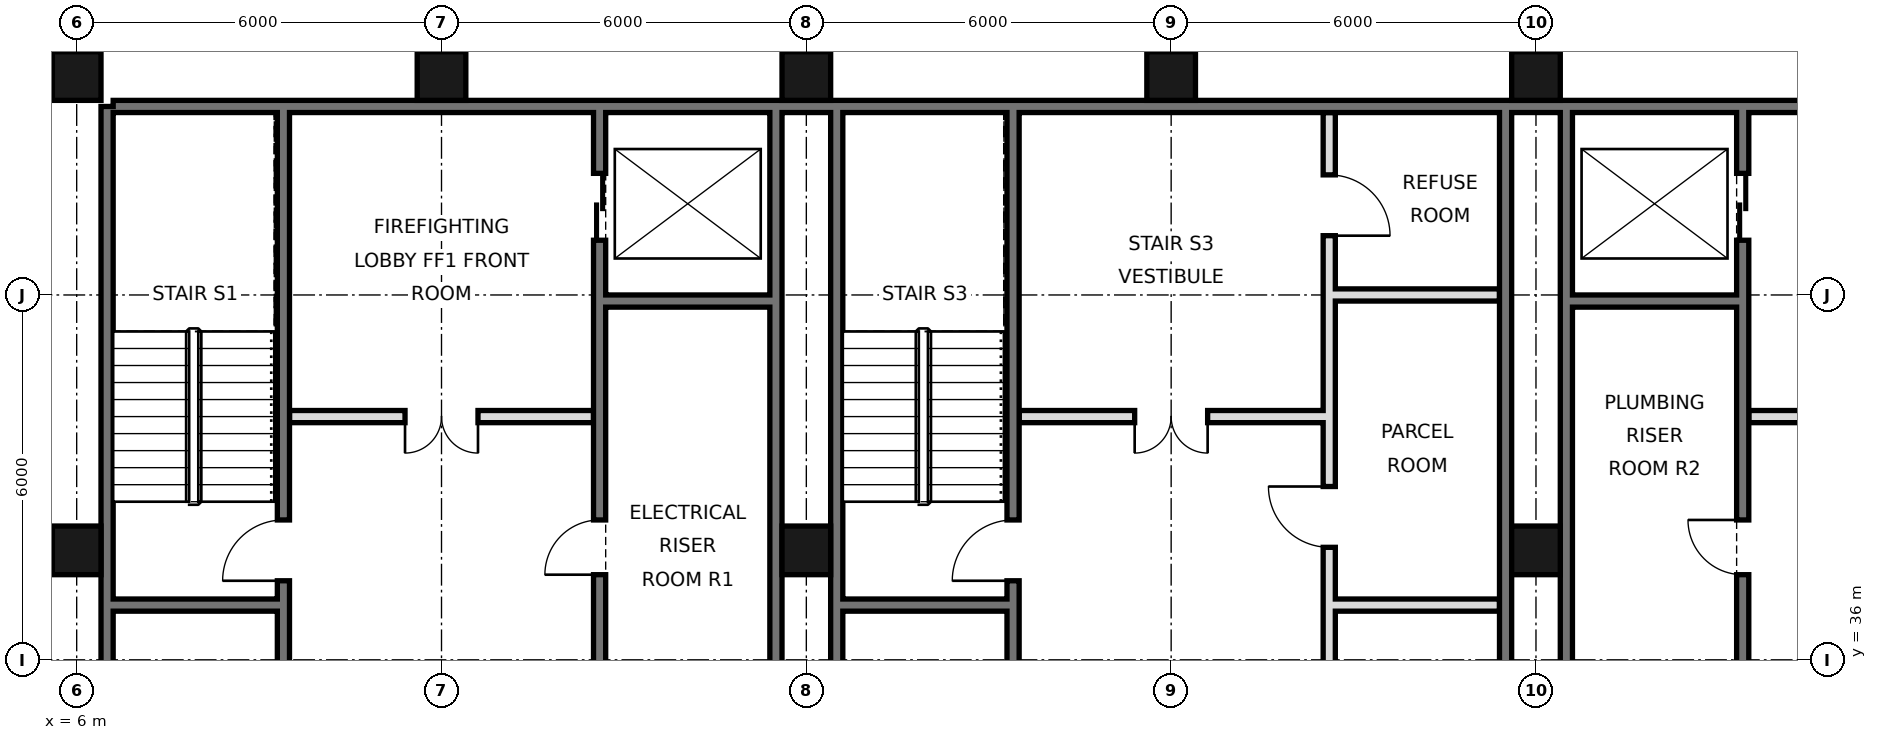
"""IFC4 building model, lengths in metres.
Left out: names, types, materials, properties, quantities, classifications, styles, units other than length and angle.
Written with IfcOpenShell. Run it as: python <this file> out.ifc"""

import sys

from ifc_helpers import new_model, si_unit, direction, frame, frame_2d, origin, origin_2d, place, context, subcontext, project, spatial, rectangle, hollow_rectangle, extrude, element, fill, save


model = new_model("IFC4")
c1 = context("Model", 3, precision=1e-05, world=origin(), true_north=direction((0.0, 1.0)))
c2 = subcontext(c1, "Body", "Model", "MODEL_VIEW")
j1 = project(units=[si_unit("LENGTHUNIT", "METRE"), si_unit("PLANEANGLEUNIT", "RADIAN")], contexts=[c1])
p1 = place(None, origin())
s1 = spatial("IfcSite", under=j1, at=p1, CompositionType="ELEMENT")
p2 = place(p1, origin())
s2 = spatial("IfcBuilding", under=s1, at=p2, CompositionType="ELEMENT")
p3 = place(p2, frame((0.0, 0.0, 239.6)))
s3 = spatial("IfcBuildingStorey", under=s2, at=p3, CompositionType="ELEMENT", Elevation=239.6)
for number, where, z_axis, x_axis in (
    (1, (6.0, 37.8, 0.0), (0.0, 0.0, 1.0), (1.0, 0.0, 0.0)),
    (2, (6.0, 45.6, 0.0), (0.0, 0.0, 1.0), (1.0, 0.0, 0.0)),
    (3, (12.0, 45.6, 0.0), (0.0, 0.0, 1.0), (1.0, 0.0, 0.0)),
    (4, (18.0, 37.8, 0.0), (0.0, 0.0, 1.0), (1.0, 0.0, 0.0)),
    (5, (18.0, 45.6, 0.0), (0.0, 0.0, 1.0), (1.0, 0.0, 0.0)),
    (6, (24.0, 45.6, 0.0), (0.0, 0.0, 1.0), (1.0, 0.0, 0.0)),
    (7, (30.0, 37.8, 0.0), (0.0, 0.0, 1.0), (1.0, 0.0, 0.0)),
    (8, (30.0, 45.6, 0.0), (0.0, 0.0, 1.0), (1.0, 0.0, 0.0)),
):
    element("IfcColumn", number, at=place(p3, frame(where, z_axis=z_axis, x_axis=x_axis)), inside=s3, PredefinedType="COLUMN", context=c2, shape_type="SweptSolid", body=[
        extrude(hollow_rectangle(XDim=0.8, YDim=0.8, WallThickness=0.04, at=origin_2d()), origin(), (0.0, 0.0, 1.0), 3.6),
    ])
p4 = place(p3, frame((6.5, 21.6, 0.0), z_axis=(0.0, 0.0, 1.0), x_axis=(0.0, 1.0, 0.0)))
e9 = element("IfcWall", 9, at=p4, inside=s3, PredefinedType="SOLIDWALL", context=c2, shape_type="SweptSolid", body=[
    extrude(rectangle(XDim=23.5, YDim=0.2, at=frame_2d((11.75, 0.0))), origin(), (0.0, 0.0, 1.0), 3.42),
])
p5 = place(p3, frame((6.6, 45.1, 0.0), z_axis=(0.0, 0.0, 1.0), x_axis=(1.0, 0.0, 0.0)))
e10 = element("IfcWall", 10, at=p5, inside=s3, PredefinedType="SOLIDWALL", context=c2, shape_type="SweptSolid", body=[
    extrude(rectangle(XDim=34.8, YDim=0.2, at=frame_2d((17.4, 0.0))), origin(), (0.0, 0.0, 1.0), 3.42),
])
for number, where, z_axis, x_axis in (
    (11, (17.5, 27.6, 0.0), (0.0, 0.0, 1.0), (0.0, 1.0, 0.0)),
    (12, (18.5, 27.6, 0.0), (0.0, 0.0, 1.0), (0.0, 1.0, 0.0)),
    (13, (29.5, 27.6, 0.0), (0.0, 0.0, 1.0), (0.0, 1.0, 0.0)),
    (14, (30.5, 27.6, 0.0), (0.0, 0.0, 1.0), (0.0, 1.0, 0.0)),
):
    element("IfcWall", number, at=place(p3, frame(where, z_axis=z_axis, x_axis=x_axis)), inside=s3, PredefinedType="SOLIDWALL", context=c2, shape_type="SweptSolid", body=[
        extrude(rectangle(XDim=17.5, YDim=0.2, at=frame_2d((8.75, 0.0))), origin(), (0.0, 0.0, 1.0), 3.42),
    ])
p6 = place(p3, frame((14.6, 27.5, 0.0), z_axis=(0.0, 0.0, 1.0), x_axis=(0.0, 1.0, 0.0)))
e15 = element("IfcWall", 15, at=p6, inside=s3, PredefinedType="SOLIDWALL", context=c2, shape_type="SweptSolid", body=[
    extrude(rectangle(XDim=17.5, YDim=0.2, at=frame_2d((8.75, 0.0))), origin(), (0.0, 0.0, 1.0), 3.42),
])
p7 = place(p6, frame((15.4, 0.0, 0.0)))
e16 = element("IfcOpeningElement", 16, at=p7, cuts=e15, PredefinedType="OPENING", context=c2, shape_type="SweptSolid", body=[
    extrude(rectangle(XDim=1.1, YDim=2.1, at=frame_2d((0.55, 1.05))), frame((0.0, 0.11, 0.0), z_axis=(0.0, -1.0, 0.0), x_axis=(1.0, 0.0, 0.0)), (0.0, 0.0, 1.0), 0.22),
])
p8 = place(p6, frame((2.7, 0.0, 0.0)))
e17 = element("IfcOpeningElement", 17, at=p8, cuts=e15, PredefinedType="OPENING", context=c2, shape_type="SweptSolid", body=[
    extrude(rectangle(XDim=1.0, YDim=2.1, at=frame_2d((0.5, 1.05))), frame((0.0, 0.11, 0.0), z_axis=(0.0, -1.0, 0.0), x_axis=(1.0, 0.0, 0.0)), (0.0, 0.0, 1.0), 0.22),
])
p9 = place(p6, frame((9.9, 0.0, 0.0)))
e18 = element("IfcOpeningElement", 18, at=p9, cuts=e15, PredefinedType="OPENING", context=c2, shape_type="SweptSolid", body=[
    extrude(rectangle(XDim=0.9, YDim=2.1, at=frame_2d((0.45, 1.05))), frame((0.0, 0.11, 0.0), z_axis=(0.0, -1.0, 0.0), x_axis=(1.0, 0.0, 0.0)), (0.0, 0.0, 1.0), 0.22),
])
p10 = place(p3, frame((21.4, 27.5, 0.0), z_axis=(0.0, 0.0, 1.0), x_axis=(0.0, 1.0, 0.0)))
e19 = element("IfcWall", 19, at=p10, inside=s3, PredefinedType="SOLIDWALL", context=c2, shape_type="SweptSolid", body=[
    extrude(rectangle(XDim=17.5, YDim=0.2, at=frame_2d((8.75, 0.0))), origin(), (0.0, 0.0, 1.0), 3.42),
])
p11 = place(p10, frame((0.55, 0.0, 0.0)))
e20 = element("IfcOpeningElement", 20, at=p11, cuts=e19, PredefinedType="OPENING", context=c2, shape_type="SweptSolid", body=[
    extrude(rectangle(XDim=1.0, YDim=2.1, at=frame_2d((0.5, 1.05))), frame((0.0, 0.11, 0.0), z_axis=(0.0, -1.0, 0.0), x_axis=(1.0, 0.0, 0.0)), (0.0, 0.0, 1.0), 0.22),
])
p12 = place(p10, frame((3.65, 0.0, 0.0)))
e21 = element("IfcOpeningElement", 21, at=p12, cuts=e19, PredefinedType="OPENING", context=c2, shape_type="SweptSolid", body=[
    extrude(rectangle(XDim=1.0, YDim=2.1, at=frame_2d((0.5, 1.05))), frame((0.0, 0.11, 0.0), z_axis=(0.0, -1.0, 0.0), x_axis=(1.0, 0.0, 0.0)), (0.0, 0.0, 1.0), 0.22),
])
p13 = place(p10, frame((9.8, 0.0, 0.0)))
e22 = element("IfcOpeningElement", 22, at=p13, cuts=e19, PredefinedType="OPENING", context=c2, shape_type="SweptSolid", body=[
    extrude(rectangle(XDim=1.0, YDim=2.1, at=frame_2d((0.5, 1.05))), frame((0.0, 0.11, 0.0), z_axis=(0.0, -1.0, 0.0), x_axis=(1.0, 0.0, 0.0)), (0.0, 0.0, 1.0), 0.22),
])
p14 = place(p10, frame((7.4, 0.0, 0.0)))
e23 = element("IfcOpeningElement", 23, at=p14, cuts=e19, PredefinedType="OPENING", context=c2, shape_type="SweptSolid", body=[
    extrude(rectangle(XDim=0.9, YDim=2.1, at=frame_2d((0.45, 1.05))), frame((0.0, 0.11, 0.0), z_axis=(0.0, -1.0, 0.0), x_axis=(1.0, 0.0, 0.0)), (0.0, 0.0, 1.0), 0.22),
])
p15 = place(p3, frame((26.6, 27.5, 0.0), z_axis=(0.0, 0.0, 1.0), x_axis=(0.0, 1.0, 0.0)))
e24 = element("IfcWall", 24, at=p15, inside=s3, PredefinedType="SOLIDWALL", context=c2, shape_type="SweptSolid", body=[
    extrude(rectangle(XDim=17.5, YDim=0.2, at=frame_2d((8.75, 0.0))), origin(), (0.0, 0.0, 1.0), 3.42),
])
p16 = place(p15, frame((4.3, 0.0, 0.0)))
e25 = element("IfcOpeningElement", 25, at=p16, cuts=e24, PredefinedType="OPENING", context=c2, shape_type="SweptSolid", body=[
    extrude(rectangle(XDim=0.9, YDim=2.1, at=frame_2d((0.45, 1.05))), frame((0.0, 0.11, 0.0), z_axis=(0.0, -1.0, 0.0), x_axis=(1.0, 0.0, 0.0)), (0.0, 0.0, 1.0), 0.22),
])
p17 = place(p15, frame((10.35, 0.0, 0.0)))
e26 = element("IfcOpeningElement", 26, at=p17, cuts=e24, PredefinedType="OPENING", context=c2, shape_type="SweptSolid", body=[
    extrude(rectangle(XDim=1.0, YDim=2.1, at=frame_2d((0.5, 1.05))), frame((0.0, 0.11, 0.0), z_axis=(0.0, -1.0, 0.0), x_axis=(1.0, 0.0, 0.0)), (0.0, 0.0, 1.0), 0.22),
])
p18 = place(p15, frame((15.475, 0.0, 0.0)))
e27 = element("IfcOpeningElement", 27, at=p18, cuts=e24, PredefinedType="OPENING", context=c2, shape_type="SweptSolid", body=[
    extrude(rectangle(XDim=1.0, YDim=2.1, at=frame_2d((0.5, 1.05))), frame((0.0, 0.11, 0.0), z_axis=(0.0, -1.0, 0.0), x_axis=(1.0, 0.0, 0.0)), (0.0, 0.0, 1.0), 0.22),
])
p19 = place(p3, frame((33.4, 27.5, 0.0), z_axis=(0.0, 0.0, 1.0), x_axis=(0.0, 1.0, 0.0)))
e28 = element("IfcWall", 28, at=p19, inside=s3, PredefinedType="SOLIDWALL", context=c2, shape_type="SweptSolid", body=[
    extrude(rectangle(XDim=17.5, YDim=0.2, at=frame_2d((8.75, 0.0))), origin(), (0.0, 0.0, 1.0), 3.42),
])
p20 = place(p19, frame((1.1, 0.0, 0.0)))
e29 = element("IfcOpeningElement", 29, at=p20, cuts=e28, PredefinedType="OPENING", context=c2, shape_type="SweptSolid", body=[
    extrude(rectangle(XDim=1.1, YDim=2.1, at=frame_2d((0.55, 1.05))), frame((0.0, 0.11, 0.0), z_axis=(0.0, -1.0, 0.0), x_axis=(1.0, 0.0, 0.0)), (0.0, 0.0, 1.0), 0.22),
])
p21 = place(p19, frame((4.2, 0.0, 0.0)))
e30 = element("IfcOpeningElement", 30, at=p21, cuts=e28, PredefinedType="OPENING", context=c2, shape_type="SweptSolid", body=[
    extrude(rectangle(XDim=1.1, YDim=2.1, at=frame_2d((0.55, 1.05))), frame((0.0, 0.11, 0.0), z_axis=(0.0, -1.0, 0.0), x_axis=(1.0, 0.0, 0.0)), (0.0, 0.0, 1.0), 0.22),
])
p22 = place(p19, frame((15.4, 0.0, 0.0)))
e31 = element("IfcOpeningElement", 31, at=p22, cuts=e28, PredefinedType="OPENING", context=c2, shape_type="SweptSolid", body=[
    extrude(rectangle(XDim=1.1, YDim=2.1, at=frame_2d((0.55, 1.05))), frame((0.0, 0.11, 0.0), z_axis=(0.0, -1.0, 0.0), x_axis=(1.0, 0.0, 0.0)), (0.0, 0.0, 1.0), 0.22),
])
p23 = place(p19, frame((9.9, 0.0, 0.0)))
e32 = element("IfcOpeningElement", 32, at=p23, cuts=e28, PredefinedType="OPENING", context=c2, shape_type="SweptSolid", body=[
    extrude(rectangle(XDim=0.9, YDim=2.1, at=frame_2d((0.45, 1.05))), frame((0.0, 0.11, 0.0), z_axis=(0.0, -1.0, 0.0), x_axis=(1.0, 0.0, 0.0)), (0.0, 0.0, 1.0), 0.22),
])
p24 = place(p3, frame((9.4, 21.6, 0.0), z_axis=(0.0, 0.0, 1.0), x_axis=(0.0, 1.0, 0.0)))
e33 = element("IfcWall", 33, at=p24, inside=s3, PredefinedType="SOLIDWALL", context=c2, shape_type="SweptSolid", body=[
    extrude(rectangle(XDim=23.4, YDim=0.2, at=frame_2d((11.7, 0.0))), origin(), (0.0, 0.0, 1.0), 3.42),
])
p25 = place(p24, frame((7.8, 0.0, 0.0)))
e34 = element("IfcOpeningElement", 34, at=p25, cuts=e33, PredefinedType="OPENING", context=c2, shape_type="SweptSolid", body=[
    extrude(rectangle(XDim=1.0, YDim=2.1, at=frame_2d((0.5, 1.05))), frame((0.0, 0.11, 0.0), z_axis=(0.0, -1.0, 0.0), x_axis=(1.0, 0.0, 0.0)), (0.0, 0.0, 1.0), 0.22),
])
p26 = place(p24, frame((12.45, 0.0, 0.0)))
e35 = element("IfcOpeningElement", 35, at=p26, cuts=e33, PredefinedType="OPENING", context=c2, shape_type="SweptSolid", body=[
    extrude(rectangle(XDim=1.0, YDim=2.1, at=frame_2d((0.5, 1.05))), frame((0.0, 0.11, 0.0), z_axis=(0.0, -1.0, 0.0), x_axis=(1.0, 0.0, 0.0)), (0.0, 0.0, 1.0), 0.22),
])
p27 = place(p24, frame((15.7, 0.0, 0.0)))
e36 = element("IfcOpeningElement", 36, at=p27, cuts=e33, PredefinedType="OPENING", context=c2, shape_type="SweptSolid", body=[
    extrude(rectangle(XDim=1.0, YDim=2.1, at=frame_2d((0.5, 1.05))), frame((0.0, 0.11, 0.0), z_axis=(0.0, -1.0, 0.0), x_axis=(1.0, 0.0, 0.0)), (0.0, 0.0, 1.0), 0.22),
])
p28 = place(p24, frame((0.175, 0.0, 0.0)))
e37 = element("IfcOpeningElement", 37, at=p28, cuts=e33, PredefinedType="OPENING", context=c2, shape_type="SweptSolid", body=[
    extrude(rectangle(XDim=0.9, YDim=2.1, at=frame_2d((0.45, 1.05))), frame((0.0, 0.11, 0.0), z_axis=(0.0, -1.0, 0.0), x_axis=(1.0, 0.0, 0.0)), (0.0, 0.0, 1.0), 0.22),
])
for number, where, z_axis, x_axis in (
    (38, (18.6, 36.9, 0.0), (0.0, 0.0, 1.0), (1.0, 0.0, 0.0)),
    (39, (26.7, 36.9, 0.0), (0.0, 0.0, 1.0), (1.0, 0.0, 0.0)),
    (40, (6.6, 36.9, 0.0), (0.0, 0.0, 1.0), (1.0, 0.0, 0.0)),
):
    element("IfcWall", number, at=place(p3, frame(where, z_axis=z_axis, x_axis=x_axis)), inside=s3, PredefinedType="SOLIDWALL", context=c2, shape_type="SweptSolid", body=[
        extrude(rectangle(XDim=2.7, YDim=0.2, at=frame_2d((1.35, 0.0))), origin(), (0.0, 0.0, 1.0), 3.42),
    ])
p29 = place(p3, frame((21.5, 40.0, 0.0), z_axis=(0.0, 0.0, 1.0), x_axis=(1.0, 0.0, 0.0)))
e41 = element("IfcWall", 41, at=p29, inside=s3, PredefinedType="PARTITIONING", context=c2, shape_type="SweptSolid", body=[
    extrude(rectangle(XDim=5.0, YDim=0.2, at=frame_2d((2.5, 0.0))), origin(), (0.0, 0.0, 1.0), 3.42),
])
p30 = place(p29, frame((1.9, 0.0, 0.0)))
e42 = element("IfcOpeningElement", 42, at=p30, cuts=e41, PredefinedType="OPENING", context=c2, shape_type="SweptSolid", body=[
    extrude(rectangle(XDim=1.2, YDim=2.1, at=frame_2d((0.6, 1.05))), frame((0.0, 0.11, 0.0), z_axis=(0.0, -1.0, 0.0), x_axis=(1.0, 0.0, 0.0)), (0.0, 0.0, 1.0), 0.22),
])
p31 = place(p3, frame((33.5, 40.0, 0.0), z_axis=(0.0, 0.0, 1.0), x_axis=(1.0, 0.0, 0.0)))
e43 = element("IfcWall", 43, at=p31, inside=s3, PredefinedType="PARTITIONING", context=c2, shape_type="SweptSolid", body=[
    extrude(rectangle(XDim=5.0, YDim=0.2, at=frame_2d((2.5, 0.0))), origin(), (0.0, 0.0, 1.0), 3.42),
])
p32 = place(p31, frame((1.9, 0.0, 0.0)))
e44 = element("IfcOpeningElement", 44, at=p32, cuts=e43, PredefinedType="OPENING", context=c2, shape_type="SweptSolid", body=[
    extrude(rectangle(XDim=1.2, YDim=2.1, at=frame_2d((0.6, 1.05))), frame((0.0, 0.11, 0.0), z_axis=(0.0, -1.0, 0.0), x_axis=(1.0, 0.0, 0.0)), (0.0, 0.0, 1.0), 0.22),
])
p33 = place(p3, frame((9.5, 40.0, 0.0), z_axis=(0.0, 0.0, 1.0), x_axis=(1.0, 0.0, 0.0)))
e45 = element("IfcWall", 45, at=p33, inside=s3, PredefinedType="PARTITIONING", context=c2, shape_type="SweptSolid", body=[
    extrude(rectangle(XDim=5.0, YDim=0.2, at=frame_2d((2.5, 0.0))), origin(), (0.0, 0.0, 1.0), 3.42),
])
p34 = place(p33, frame((1.9, 0.0, 0.0)))
e46 = element("IfcOpeningElement", 46, at=p34, cuts=e45, PredefinedType="OPENING", context=c2, shape_type="SweptSolid", body=[
    extrude(rectangle(XDim=1.2, YDim=2.1, at=frame_2d((0.6, 1.05))), frame((0.0, 0.11, 0.0), z_axis=(0.0, -1.0, 0.0), x_axis=(1.0, 0.0, 0.0)), (0.0, 0.0, 1.0), 0.22),
])
for number, where, z_axis, x_axis in (
    (47, (14.7, 41.9, 0.0), (0.0, 0.0, 1.0), (1.0, 0.0, 0.0)),
    (48, (30.6, 41.9, 0.0), (0.0, 0.0, 1.0), (1.0, 0.0, 0.0)),
):
    element("IfcWall", number, at=place(p3, frame(where, z_axis=z_axis, x_axis=x_axis)), inside=s3, PredefinedType="SOLIDWALL", context=c2, shape_type="SweptSolid", body=[
        extrude(rectangle(XDim=2.7, YDim=0.2, at=frame_2d((1.35, 0.0))), origin(), (0.0, 0.0, 1.0), 3.42),
    ])
p35 = place(p3, frame((26.7, 42.0, 0.0), z_axis=(0.0, 0.0, 1.0), x_axis=(1.0, 0.0, 0.0)))
e49 = element("IfcWall", 49, at=p35, inside=s3, PredefinedType="PARTITIONING", context=c2, shape_type="SweptSolid", body=[
    extrude(rectangle(XDim=2.7, YDim=0.2, at=frame_2d((1.35, 0.0))), origin(), (0.0, 0.0, 1.0), 3.42),
])
p36 = place(p34, frame((1.2, 0.0, 0.0), z_axis=(0.0, 0.0, 1.0), x_axis=(-1.0, 0.0, 0.0)))
e50 = element("IfcDoor", 50, at=p36, inside=s3, OperationType="DOUBLE_DOOR_SINGLE_SWING", PredefinedType="DOOR", context=c2, shape_type="SweptSolid", body=[
    extrude(rectangle(XDim=1.2, YDim=2.1, at=frame_2d((0.6, 1.05))), frame((0.0, 0.025, 0.0), z_axis=(0.0, -1.0, 0.0), x_axis=(1.0, 0.0, 0.0)), (0.0, 0.0, 1.0), 0.05),
])
fill(e46, e50)
p37 = place(p30, frame((1.2, 0.0, 0.0), z_axis=(0.0, 0.0, 1.0), x_axis=(-1.0, 0.0, 0.0)))
e51 = element("IfcDoor", 51, at=p37, inside=s3, OperationType="DOUBLE_DOOR_SINGLE_SWING", PredefinedType="DOOR", context=c2, shape_type="SweptSolid", body=[
    extrude(rectangle(XDim=1.2, YDim=2.1, at=frame_2d((0.6, 1.05))), frame((0.0, 0.025, 0.0), z_axis=(0.0, -1.0, 0.0), x_axis=(1.0, 0.0, 0.0)), (0.0, 0.0, 1.0), 0.05),
])
fill(e42, e51)
p38 = place(p22, origin())
e52 = element("IfcDoor", 52, at=p38, inside=s3, OperationType="DOUBLE_DOOR_SLIDING", PredefinedType="DOOR", context=c2, shape_type="SweptSolid", body=[
    extrude(rectangle(XDim=1.1, YDim=2.1, at=frame_2d((0.55, 1.05))), frame((0.0, 0.025, 0.0), z_axis=(0.0, -1.0, 0.0), x_axis=(1.0, 0.0, 0.0)), (0.0, 0.0, 1.0), 0.05),
])
fill(e31, e52)
p39 = place(p7, origin())
e53 = element("IfcDoor", 53, at=p39, inside=s3, OperationType="DOUBLE_DOOR_SLIDING", PredefinedType="DOOR", context=c2, shape_type="SweptSolid", body=[
    extrude(rectangle(XDim=1.1, YDim=2.1, at=frame_2d((0.55, 1.05))), frame((0.0, 0.025, 0.0), z_axis=(0.0, -1.0, 0.0), x_axis=(1.0, 0.0, 0.0)), (0.0, 0.0, 1.0), 0.05),
])
fill(e16, e53)
p40 = place(p27, origin())
e54 = element("IfcDoor", 54, at=p40, inside=s3, OperationType="SINGLE_SWING_LEFT", PredefinedType="DOOR", context=c2, shape_type="SweptSolid", body=[
    extrude(rectangle(XDim=1.0, YDim=2.1, at=frame_2d((0.5, 1.05))), frame((0.0, 0.025, 0.0), z_axis=(0.0, -1.0, 0.0), x_axis=(1.0, 0.0, 0.0)), (0.0, 0.0, 1.0), 0.05),
])
fill(e36, e54)
p41 = place(p13, origin())
e55 = element("IfcDoor", 55, at=p41, inside=s3, OperationType="SINGLE_SWING_LEFT", PredefinedType="DOOR", context=c2, shape_type="SweptSolid", body=[
    extrude(rectangle(XDim=1.0, YDim=2.1, at=frame_2d((0.5, 1.05))), frame((0.0, 0.025, 0.0), z_axis=(0.0, -1.0, 0.0), x_axis=(1.0, 0.0, 0.0)), (0.0, 0.0, 1.0), 0.05),
])
fill(e22, e55)
p42 = place(p9, origin())
e56 = element("IfcDoor", 56, at=p42, inside=s3, OperationType="SINGLE_SWING_LEFT", PredefinedType="DOOR", context=c2, shape_type="SweptSolid", body=[
    extrude(rectangle(XDim=0.9, YDim=2.1, at=frame_2d((0.45, 1.05))), frame((0.0, 0.025, 0.0), z_axis=(0.0, -1.0, 0.0), x_axis=(1.0, 0.0, 0.0)), (0.0, 0.0, 1.0), 0.05),
])
fill(e18, e56)
p43 = place(p23, frame((0.9, 0.0, 0.0), z_axis=(0.0, 0.0, 1.0), x_axis=(-1.0, 0.0, 0.0)))
e57 = element("IfcDoor", 57, at=p43, inside=s3, OperationType="SINGLE_SWING_LEFT", PredefinedType="DOOR", context=c2, shape_type="SweptSolid", body=[
    extrude(rectangle(XDim=0.9, YDim=2.1, at=frame_2d((0.45, 1.05))), frame((0.0, 0.025, 0.0), z_axis=(0.0, -1.0, 0.0), x_axis=(1.0, 0.0, 0.0)), (0.0, 0.0, 1.0), 0.05),
])
fill(e32, e57)
p44 = place(p17, frame((1.0, 0.0, 0.0), z_axis=(0.0, 0.0, 1.0), x_axis=(-1.0, 0.0, 0.0)))
e58 = element("IfcDoor", 58, at=p44, inside=s3, OperationType="SINGLE_SWING_LEFT", PredefinedType="DOOR", context=c2, shape_type="SweptSolid", body=[
    extrude(rectangle(XDim=1.0, YDim=2.1, at=frame_2d((0.5, 1.05))), frame((0.0, 0.025, 0.0), z_axis=(0.0, -1.0, 0.0), x_axis=(1.0, 0.0, 0.0)), (0.0, 0.0, 1.0), 0.05),
])
fill(e26, e58)
p45 = place(p18, frame((1.0, 0.0, 0.0), z_axis=(0.0, 0.0, 1.0), x_axis=(-1.0, 0.0, 0.0)))
e59 = element("IfcDoor", 59, at=p45, inside=s3, OperationType="SINGLE_SWING_RIGHT", PredefinedType="DOOR", context=c2, shape_type="SweptSolid", body=[
    extrude(rectangle(XDim=1.0, YDim=2.1, at=frame_2d((0.5, 1.05))), frame((0.0, 0.025, 0.0), z_axis=(0.0, -1.0, 0.0), x_axis=(1.0, 0.0, 0.0)), (0.0, 0.0, 1.0), 0.05),
])
fill(e27, e59)
save(model, sys.argv[1])
